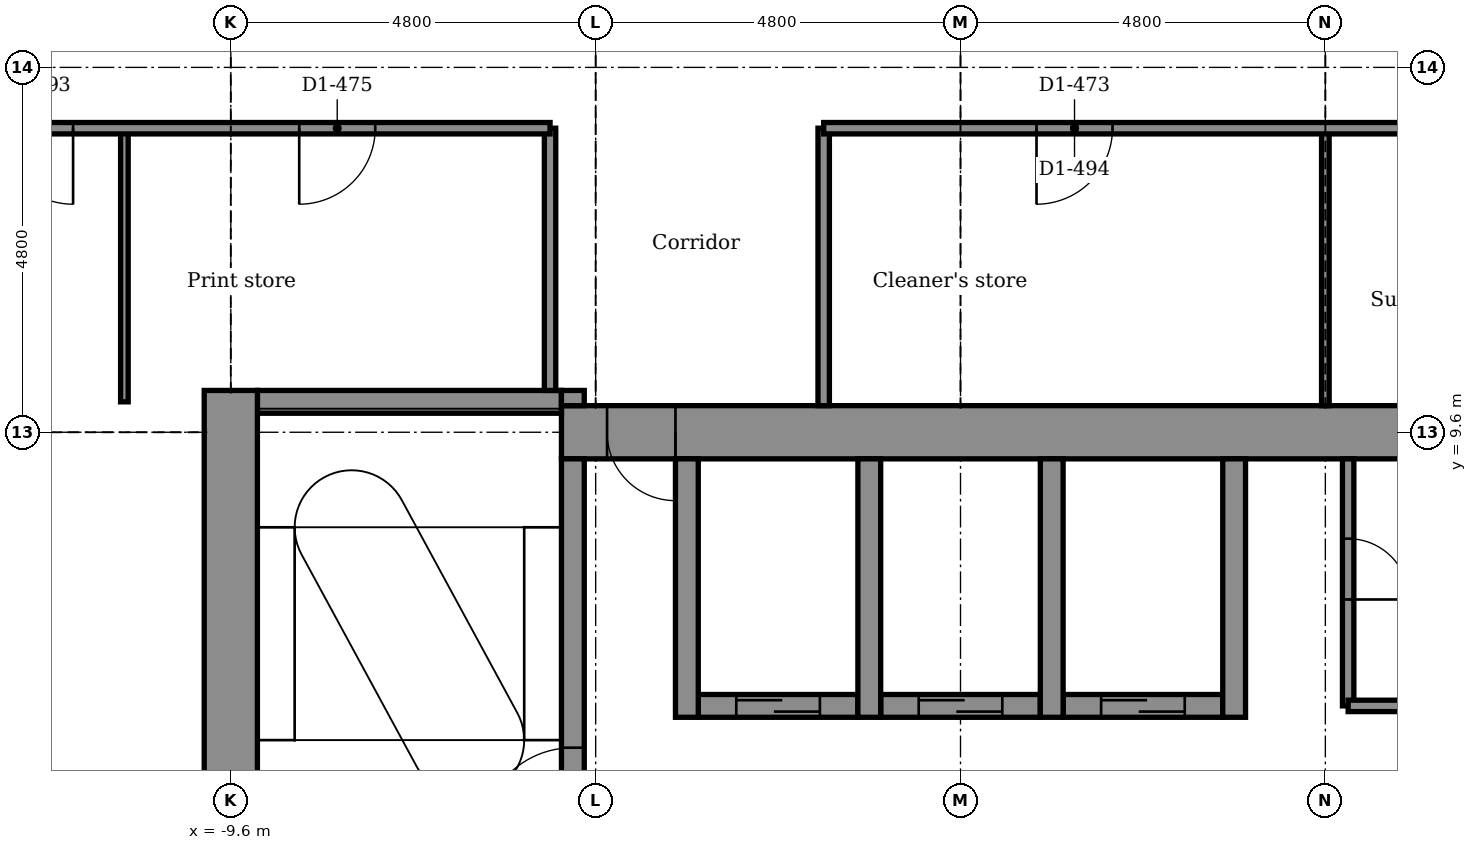
"""IFC4 building model, lengths in metres.
Left out: names, types, materials, properties, quantities, classifications, styles, units other than length and angle.
Written with IfcOpenShell. Run it as: python <this file> out.ifc"""

import sys

from ifc_helpers import new_model, si_unit, direction, frame, frame_2d, origin, place, context, subcontext, project, spatial, rectangle, extrude, element, fill, save


model = new_model("IFC4")
c1 = context("Model", 3, precision=1e-05, world=origin(), true_north=direction((0.0, 1.0)))
c2 = subcontext(c1, "Body", "Model", "MODEL_VIEW")
j1 = project(units=[si_unit("LENGTHUNIT", "METRE"), si_unit("PLANEANGLEUNIT", "RADIAN")], contexts=[c1])
p1 = place(None, origin())
s1 = spatial("IfcSite", under=j1, at=p1, CompositionType="ELEMENT")
p2 = place(p1, origin())
s2 = spatial("IfcBuilding", under=s1, at=p2, CompositionType="ELEMENT")
p3 = place(p2, frame((0.0, 0.0, 170.0)))
s3 = spatial("IfcBuildingStorey", under=s2, at=p3, CompositionType="ELEMENT", Elevation=170.0)
p4 = place(p3, frame((-3.45, 6.0, -0.15), z_axis=(0.0, 0.0, 1.0), x_axis=(1.0, 0.0, 0.0)))
e1 = element("IfcWall", 1, at=p4, inside=s3, PredefinedType="STANDARD", context=c2, shape_type="SweptSolid", body=[
    extrude(rectangle(XDim=2.1, YDim=0.3, at=frame_2d((1.05, 0.0))), origin(), (0.0, 0.0, 1.0), 3.9),
])
p5 = place(p4, frame((0.5, 0.0, 0.15)))
e2 = element("IfcOpeningElement", 2, at=p5, cuts=e1, PredefinedType="OPENING", context=c2, shape_type="SweptSolid", body=[
    extrude(rectangle(XDim=1.1, YDim=2.1, at=frame_2d((0.55, 1.05))), frame((0.0, 0.16, 0.0), z_axis=(0.0, -1.0, 0.0), x_axis=(1.0, 0.0, 0.0)), (0.0, 0.0, 1.0), 0.32),
])
p6 = place(p3, frame((-1.05, 6.0, -0.15), z_axis=(0.0, 0.0, 1.0), x_axis=(1.0, 0.0, 0.0)))
e3 = element("IfcWall", 3, at=p6, inside=s3, PredefinedType="STANDARD", context=c2, shape_type="SweptSolid", body=[
    extrude(rectangle(XDim=2.1, YDim=0.3, at=frame_2d((1.05, 0.0))), origin(), (0.0, 0.0, 1.0), 3.9),
])
p7 = place(p6, frame((0.5, 0.0, 0.15)))
e4 = element("IfcOpeningElement", 4, at=p7, cuts=e3, PredefinedType="OPENING", context=c2, shape_type="SweptSolid", body=[
    extrude(rectangle(XDim=1.1, YDim=2.1, at=frame_2d((0.55, 1.05))), frame((0.0, 0.16, 0.0), z_axis=(0.0, -1.0, 0.0), x_axis=(1.0, 0.0, 0.0)), (0.0, 0.0, 1.0), 0.32),
])
p8 = place(p3, frame((1.35, 6.0, -0.15), z_axis=(0.0, 0.0, 1.0), x_axis=(1.0, 0.0, 0.0)))
e5 = element("IfcWall", 5, at=p8, inside=s3, PredefinedType="STANDARD", context=c2, shape_type="SweptSolid", body=[
    extrude(rectangle(XDim=2.1, YDim=0.3, at=frame_2d((1.05, 0.0))), origin(), (0.0, 0.0, 1.0), 3.9),
])
p9 = place(p8, frame((0.5, 0.0, 0.15)))
e6 = element("IfcOpeningElement", 6, at=p9, cuts=e5, PredefinedType="OPENING", context=c2, shape_type="SweptSolid", body=[
    extrude(rectangle(XDim=1.1, YDim=2.1, at=frame_2d((0.55, 1.05))), frame((0.0, 0.16, 0.0), z_axis=(0.0, -1.0, 0.0), x_axis=(1.0, 0.0, 0.0)), (0.0, 0.0, 1.0), 0.32),
])
p10 = place(p3, frame((-5.25, 9.6, -0.15), z_axis=(0.0, 0.0, 1.0), x_axis=(1.0, 0.0, 0.0)))
e7 = element("IfcWall", 7, at=p10, inside=s3, PredefinedType="SHEAR", context=c2, shape_type="SweptSolid", body=[
    extrude(rectangle(XDim=14.5, YDim=0.7, at=frame_2d((7.25, 0.0))), origin(), (0.0, 0.0, 1.0), 3.9),
])
p11 = place(p10, frame((0.6, 0.0, 0.15)))
e8 = element("IfcOpeningElement", 8, at=p11, cuts=e7, PredefinedType="OPENING", context=c2, shape_type="SweptSolid", body=[
    extrude(rectangle(XDim=0.9, YDim=2.1, at=frame_2d((0.45, 1.05))), frame((0.0, 0.36, 0.0), z_axis=(0.0, -1.0, 0.0), x_axis=(1.0, 0.0, 0.0)), (0.0, 0.0, 1.0), 0.72),
])
p12 = place(p3, frame((-9.25, 10.0, -0.15), z_axis=(0.0, 0.0, 1.0), x_axis=(1.0, 0.0, 0.0)))
e9 = element("IfcWall", 9, at=p12, inside=s3, PredefinedType="STANDARD", context=c2, shape_type="SweptSolid", body=[
    extrude(rectangle(XDim=4.0, YDim=0.3, at=frame_2d((2.0, 0.0))), origin(), (0.0, 0.0, 1.0), 3.9),
])
p13 = place(p3, frame((-9.6, 2.55, -0.15), z_axis=(0.0, 0.0, 1.0), x_axis=(0.0, 1.0, 0.0)))
e10 = element("IfcWall", 10, at=p13, inside=s3, PredefinedType="SHEAR", context=c2, shape_type="SweptSolid", body=[
    extrude(rectangle(XDim=7.6, YDim=0.7, at=frame_2d((3.8, 0.0))), origin(), (0.0, 0.0, 1.0), 3.9),
])
p14 = place(p3, frame((-5.1, 2.25, -0.15), z_axis=(0.0, 0.0, 1.0), x_axis=(0.0, 1.0, 0.0)))
e11 = element("IfcWall", 11, at=p14, inside=s3, PredefinedType="STANDARD", context=c2, shape_type="SweptSolid", body=[
    extrude(rectangle(XDim=7.0, YDim=0.3, at=frame_2d((3.5, 0.0))), origin(), (0.0, 0.0, 1.0), 3.9),
])
p15 = place(p14, frame((2.0, 0.0, 0.15)))
e12 = element("IfcOpeningElement", 12, at=p15, cuts=e11, PredefinedType="OPENING", context=c2, shape_type="SweptSolid", body=[
    extrude(rectangle(XDim=1.2, YDim=2.1, at=frame_2d((0.6, 1.05))), frame((0.0, 0.16, 0.0), z_axis=(0.0, -1.0, 0.0), x_axis=(1.0, 0.0, 0.0)), (0.0, 0.0, 1.0), 0.32),
])
p16 = place(p3, frame((-5.1, 9.95, -0.15), z_axis=(0.0, 0.0, 1.0), x_axis=(0.0, 1.0, 0.0)))
e13 = element("IfcWall", 13, at=p16, inside=s3, PredefinedType="STANDARD", context=c2, shape_type="SweptSolid", body=[
    extrude(rectangle(XDim=0.2, YDim=0.3, at=frame_2d((0.1, 0.0))), origin(), (0.0, 0.0, 1.0), 3.9),
])
for number, where, z_axis, x_axis in (
    (14, (-3.6, 5.85, -0.15), (0.0, 0.0, 1.0), (0.0, 1.0, 0.0)),
    (15, (-1.2, 5.85, -0.15), (0.0, 0.0, 1.0), (0.0, 1.0, 0.0)),
    (16, (1.2, 5.85, -0.15), (0.0, 0.0, 1.0), (0.0, 1.0, 0.0)),
    (17, (3.6, 5.85, -0.15), (0.0, 0.0, 1.0), (0.0, 1.0, 0.0)),
):
    element("IfcWall", number, at=place(p3, frame(where, z_axis=z_axis, x_axis=x_axis)), inside=s3, PredefinedType="STANDARD", context=c2, shape_type="SweptSolid", body=[
        extrude(rectangle(XDim=3.4, YDim=0.3, at=frame_2d((1.7, 0.0))), origin(), (0.0, 0.0, 1.0), 3.9),
    ])
p17 = place(p3, frame((5.1, 6.0, 0.0), z_axis=(0.0, 0.0, 1.0), x_axis=(0.0, 1.0, 0.0)))
e18 = element("IfcWall", 18, at=p17, inside=s3, PredefinedType="PARTITIONING", context=c2, shape_type="SweptSolid", body=[
    extrude(rectangle(XDim=3.25, YDim=0.15, at=frame_2d((1.625, 0.0))), origin(), (0.0, 0.0, 1.0), 3.75),
])
p18 = place(p17, frame((1.4, 0.0, 0.0)))
e19 = element("IfcOpeningElement", 19, at=p18, cuts=e18, PredefinedType="OPENING", context=c2, shape_type="SweptSolid", body=[
    extrude(rectangle(XDim=0.8, YDim=2.1, at=frame_2d((0.4, 1.05))), frame((0.0, 0.085, 0.0), z_axis=(0.0, -1.0, 0.0), x_axis=(1.0, 0.0, 0.0)), (0.0, 0.0, 1.0), 0.17),
])
p19 = place(p3, frame((4.8, 9.95, 0.0), z_axis=(0.0, 0.0, 1.0), x_axis=(0.0, 1.0, 0.0)))
e20 = element("IfcWall", 20, at=p19, inside=s3, PredefinedType="PARTITIONING", context=c2, shape_type="SweptSolid", body=[
    extrude(rectangle(XDim=3.65, YDim=0.1, at=frame_2d((1.825, 0.0))), origin(), (0.0, 0.0, 1.0), 3.066),
])
p20 = place(p3, frame((-1.8, 9.95, 0.0), z_axis=(0.0, 0.0, 1.0), x_axis=(0.0, 1.0, 0.0)))
e21 = element("IfcWall", 21, at=p20, inside=s3, PredefinedType="PARTITIONING", context=c2, shape_type="SweptSolid", body=[
    extrude(rectangle(XDim=3.65, YDim=0.15, at=frame_2d((1.825, 0.0))), origin(), (0.0, 0.0, 1.0), 3.75),
])
p21 = place(p3, frame((-5.4, 10.15, 0.0), z_axis=(0.0, 0.0, 1.0), x_axis=(0.0, 1.0, 0.0)))
e22 = element("IfcWall", 22, at=p21, inside=s3, PredefinedType="PARTITIONING", context=c2, shape_type="SweptSolid", body=[
    extrude(rectangle(XDim=3.45, YDim=0.15, at=frame_2d((1.725, 0.0))), origin(), (0.0, 0.0, 1.0), 3.75),
])
p22 = place(p3, frame((-11.0, 10.0, 0.0), z_axis=(0.0, 0.0, 1.0), x_axis=(0.0, 1.0, 0.0)))
e23 = element("IfcWall", 23, at=p22, inside=s3, PredefinedType="PARTITIONING", context=c2, shape_type="SweptSolid", body=[
    extrude(rectangle(XDim=3.6, YDim=0.1, at=frame_2d((1.8, 0.0))), origin(), (0.0, 0.0, 1.0), 3.75),
])
p23 = place(p3, frame((5.1, 6.0, 0.0), z_axis=(0.0, 0.0, 1.0), x_axis=(1.0, 0.0, 0.0)))
e24 = element("IfcWall", 24, at=p23, inside=s3, PredefinedType="PARTITIONING", context=c2, shape_type="SweptSolid", body=[
    extrude(rectangle(XDim=0.9, YDim=0.15, at=frame_2d((0.45, 0.0))), origin(), (0.0, 0.0, 1.0), 3.75),
])
p24 = place(p3, frame((-19.077, 13.6, 0.0), z_axis=(0.0, 0.0, 1.0), x_axis=(1.0, 0.0, 0.0)))
e25 = element("IfcWall", 25, at=p24, inside=s3, PredefinedType="PARTITIONING", context=c2, shape_type="SweptSolid", body=[
    extrude(rectangle(XDim=13.677, YDim=0.15, at=frame_2d((6.839, 0.0))), origin(), (0.0, 0.0, 1.0), 3.75),
])
p25 = place(p24, frame((10.377, 0.0, 0.0)))
e26 = element("IfcOpeningElement", 26, at=p25, cuts=e25, PredefinedType="OPENING", context=c2, shape_type="SweptSolid", body=[
    extrude(rectangle(XDim=1.0, YDim=2.1, at=frame_2d((0.5, 1.05))), frame((0.0, 0.085, 0.0), z_axis=(0.0, -1.0, 0.0), x_axis=(1.0, 0.0, 0.0)), (0.0, 0.0, 1.0), 0.17),
])
p26 = place(p24, frame((6.402, 0.0, 0.0)))
e27 = element("IfcOpeningElement", 27, at=p26, cuts=e25, PredefinedType="OPENING", context=c2, shape_type="SweptSolid", body=[
    extrude(rectangle(XDim=1.0, YDim=2.1, at=frame_2d((0.5, 1.05))), frame((0.0, 0.085, 0.0), z_axis=(0.0, -1.0, 0.0), x_axis=(1.0, 0.0, 0.0)), (0.0, 0.0, 1.0), 0.17),
])
p27 = place(p3, frame((-1.8, 13.6, 0.0), z_axis=(0.0, 0.0, 1.0), x_axis=(1.0, 0.0, 0.0)))
e28 = element("IfcWall", 28, at=p27, inside=s3, PredefinedType="PARTITIONING", context=c2, shape_type="SweptSolid", body=[
    extrude(rectangle(XDim=19.076, YDim=0.15, at=frame_2d((9.538, 0.0))), origin(), (0.0, 0.0, 1.0), 3.75),
])
p28 = place(p27, frame((2.8, 0.0, 0.0)))
e29 = element("IfcOpeningElement", 29, at=p28, cuts=e28, PredefinedType="OPENING", context=c2, shape_type="SweptSolid", body=[
    extrude(rectangle(XDim=1.0, YDim=2.1, at=frame_2d((0.5, 1.05))), frame((0.0, 0.085, 0.0), z_axis=(0.0, -1.0, 0.0), x_axis=(1.0, 0.0, 0.0)), (0.0, 0.0, 1.0), 0.17),
])
p29 = place(p27, frame((8.065, 0.0, 0.0)))
e30 = element("IfcOpeningElement", 30, at=p29, cuts=e28, PredefinedType="OPENING", context=c2, shape_type="SweptSolid", body=[
    extrude(rectangle(XDim=1.0, YDim=2.1, at=frame_2d((0.5, 1.05))), frame((0.0, 0.085, 0.0), z_axis=(0.0, -1.0, 0.0), x_axis=(1.0, 0.0, 0.0)), (0.0, 0.0, 1.0), 0.17),
])
p30 = place(p27, frame((12.225, 0.0, 0.0)))
e31 = element("IfcOpeningElement", 31, at=p30, cuts=e28, PredefinedType="OPENING", context=c2, shape_type="SweptSolid", body=[
    extrude(rectangle(XDim=1.0, YDim=2.1, at=frame_2d((0.5, 1.05))), frame((0.0, 0.085, 0.0), z_axis=(0.0, -1.0, 0.0), x_axis=(1.0, 0.0, 0.0)), (0.0, 0.0, 1.0), 0.17),
])
p31 = place(p27, frame((15.152, 0.0, 0.0)))
e32 = element("IfcOpeningElement", 32, at=p31, cuts=e28, PredefinedType="OPENING", context=c2, shape_type="SweptSolid", body=[
    extrude(rectangle(XDim=1.8, YDim=2.1, at=frame_2d((0.9, 1.05))), frame((0.0, 0.085, 0.0), z_axis=(0.0, -1.0, 0.0), x_axis=(1.0, 0.0, 0.0)), (0.0, 0.0, 1.0), 0.17),
])
p32 = place(p18, frame((0.8, 0.0, 0.0), z_axis=(0.0, 0.0, 1.0), x_axis=(-1.0, 0.0, 0.0)))
e33 = element("IfcDoor", 33, at=p32, inside=s3, OperationType="SINGLE_SWING_LEFT", PredefinedType="DOOR", context=c2, shape_type="SweptSolid", body=[
    extrude(rectangle(XDim=0.8, YDim=2.1, at=frame_2d((0.4, 1.05))), frame((0.0, 0.025, 0.0), z_axis=(0.0, -1.0, 0.0), x_axis=(1.0, 0.0, 0.0)), (0.0, 0.0, 1.0), 0.05),
])
fill(e19, e33)
p33 = place(p28, frame((1.0, 0.0, 0.0), z_axis=(0.0, 0.0, 1.0), x_axis=(-1.0, 0.0, 0.0)))
e34 = element("IfcDoor", 34, at=p33, inside=s3, OperationType="SINGLE_SWING_LEFT", PredefinedType="DOOR", context=c2, shape_type="SweptSolid", body=[
    extrude(rectangle(XDim=1.0, YDim=2.1, at=frame_2d((0.5, 1.05))), frame((0.0, 0.025, 0.0), z_axis=(0.0, -1.0, 0.0), x_axis=(1.0, 0.0, 0.0)), (0.0, 0.0, 1.0), 0.05),
])
fill(e29, e34)
p34 = place(p25, frame((1.0, 0.0, 0.0), z_axis=(0.0, 0.0, 1.0), x_axis=(-1.0, 0.0, 0.0)))
e35 = element("IfcDoor", 35, at=p34, inside=s3, OperationType="SINGLE_SWING_LEFT", PredefinedType="DOOR", context=c2, shape_type="SweptSolid", body=[
    extrude(rectangle(XDim=1.0, YDim=2.1, at=frame_2d((0.5, 1.05))), frame((0.0, 0.025, 0.0), z_axis=(0.0, -1.0, 0.0), x_axis=(1.0, 0.0, 0.0)), (0.0, 0.0, 1.0), 0.05),
])
fill(e26, e35)
p35 = place(p26, frame((1.0, 0.0, 0.0), z_axis=(0.0, 0.0, 1.0), x_axis=(-1.0, 0.0, 0.0)))
e36 = element("IfcDoor", 36, at=p35, inside=s3, OperationType="SINGLE_SWING_RIGHT", PredefinedType="DOOR", context=c2, shape_type="SweptSolid", body=[
    extrude(rectangle(XDim=1.0, YDim=2.1, at=frame_2d((0.5, 1.05))), frame((0.0, 0.025, 0.0), z_axis=(0.0, -1.0, 0.0), x_axis=(1.0, 0.0, 0.0)), (0.0, 0.0, 1.0), 0.05),
])
fill(e27, e36)
p36 = place(p5, origin())
e37 = element("IfcDoor", 37, at=p36, inside=s3, OperationType="DOUBLE_DOOR_SLIDING", PredefinedType="DOOR", context=c2, shape_type="SweptSolid", body=[
    extrude(rectangle(XDim=1.1, YDim=2.1, at=frame_2d((0.55, 1.05))), frame((0.0, 0.025, 0.0), z_axis=(0.0, -1.0, 0.0), x_axis=(1.0, 0.0, 0.0)), (0.0, 0.0, 1.0), 0.05),
])
fill(e2, e37)
p37 = place(p7, origin())
e38 = element("IfcDoor", 38, at=p37, inside=s3, OperationType="DOUBLE_DOOR_SLIDING", PredefinedType="DOOR", context=c2, shape_type="SweptSolid", body=[
    extrude(rectangle(XDim=1.1, YDim=2.1, at=frame_2d((0.55, 1.05))), frame((0.0, 0.025, 0.0), z_axis=(0.0, -1.0, 0.0), x_axis=(1.0, 0.0, 0.0)), (0.0, 0.0, 1.0), 0.05),
])
fill(e4, e38)
p38 = place(p9, origin())
e39 = element("IfcDoor", 39, at=p38, inside=s3, OperationType="DOUBLE_DOOR_SLIDING", PredefinedType="DOOR", context=c2, shape_type="SweptSolid", body=[
    extrude(rectangle(XDim=1.1, YDim=2.1, at=frame_2d((0.55, 1.05))), frame((0.0, 0.025, 0.0), z_axis=(0.0, -1.0, 0.0), x_axis=(1.0, 0.0, 0.0)), (0.0, 0.0, 1.0), 0.05),
])
fill(e6, e39)
p39 = place(p15, origin())
e40 = element("IfcDoor", 40, at=p39, inside=s3, OperationType="SINGLE_SWING_LEFT", PredefinedType="DOOR", context=c2, shape_type="SweptSolid", body=[
    extrude(rectangle(XDim=1.2, YDim=2.1, at=frame_2d((0.6, 1.05))), frame((0.0, 0.025, 0.0), z_axis=(0.0, -1.0, 0.0), x_axis=(1.0, 0.0, 0.0)), (0.0, 0.0, 1.0), 0.05),
])
fill(e12, e40)
p40 = place(p11, frame((0.9, 0.0, 0.0), z_axis=(0.0, 0.0, 1.0), x_axis=(-1.0, 0.0, 0.0)))
e41 = element("IfcDoor", 41, at=p40, inside=s3, OperationType="SINGLE_SWING_RIGHT", PredefinedType="DOOR", context=c2, shape_type="SweptSolid", body=[
    extrude(rectangle(XDim=0.9, YDim=2.1, at=frame_2d((0.45, 1.05))), frame((0.0, 0.025, 0.0), z_axis=(0.0, -1.0, 0.0), x_axis=(1.0, 0.0, 0.0)), (0.0, 0.0, 1.0), 0.05),
])
fill(e8, e41)
save(model, sys.argv[1])
